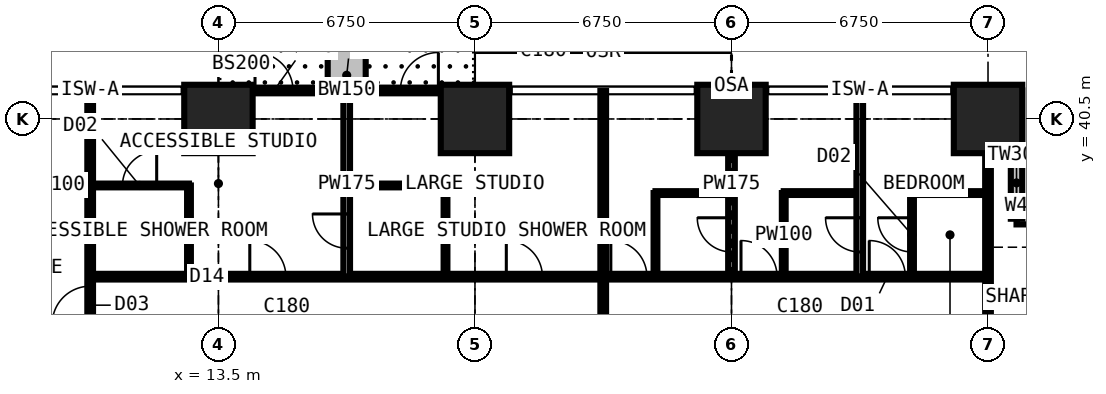
"""IFC4 building model, lengths in metres.
Left out: names, types, materials, properties, quantities, classifications, styles, units other than length and angle.
Written with IfcOpenShell. Run it as: python <this file> out.ifc"""

import sys

from ifc_helpers import new_model, si_unit, direction, frame, frame_2d, origin, origin_2d, place, context, subcontext, project, spatial, rectangle, extrude, element, fill, save


model = new_model("IFC4")
c1 = context("Model", 3, precision=1e-05, world=origin(), true_north=direction((0.0, 1.0)))
c2 = subcontext(c1, "Body", "Model", "MODEL_VIEW")
j1 = project(units=[si_unit("LENGTHUNIT", "METRE"), si_unit("PLANEANGLEUNIT", "RADIAN")], contexts=[c1])
p1 = place(None, origin())
s1 = spatial("IfcSite", under=j1, at=p1, CompositionType="ELEMENT")
p2 = place(p1, origin())
s2 = spatial("IfcBuilding", under=s1, at=p2, CompositionType="ELEMENT")
p3 = place(p2, frame((0.0, 0.0, 61.2)))
s3 = spatial("IfcBuildingStorey", under=s2, at=p3, CompositionType="ELEMENT", Elevation=61.2)
for number, where, z_axis, x_axis in (
    (1, (13.5, 40.5, 0.0), (0.0, 0.0, 1.0), (1.0, 0.0, 0.0)),
    (2, (20.25, 40.5, 0.0), (0.0, 0.0, 1.0), (1.0, 0.0, 0.0)),
    (3, (27.0, 40.5, 0.0), (0.0, 0.0, 1.0), (1.0, 0.0, 0.0)),
    (4, (33.75, 40.5, 0.0), (0.0, 0.0, 1.0), (1.0, 0.0, 0.0)),
):
    element("IfcColumn", number, at=place(p3, frame(where, z_axis=z_axis, x_axis=x_axis)), inside=s3, PredefinedType="COLUMN", context=c2, shape_type="SweptSolid", body=[
        extrude(rectangle(XDim=1.8, YDim=1.8, at=origin_2d()), origin(), (0.0, 0.0, 1.0), 3.6),
    ])
p4 = place(p3, frame((37.875, 37.875, 0.0), z_axis=(0.0, 0.0, 1.0), x_axis=(-1.0, 0.0, 0.0)))
e5 = element("IfcWall", 5, at=p4, inside=s3, PredefinedType="SOLIDWALL", context=c2, shape_type="SweptSolid", body=[
    extrude(rectangle(XDim=3.375, YDim=0.3, at=frame_2d((1.688, 0.0))), origin(), (0.0, 0.0, 1.0), 3.375),
])
p5 = place(p4, frame((0.788, 0.0, 0.6)))
e6 = element("IfcOpeningElement", 6, at=p5, cuts=e5, PredefinedType="OPENING", context=c2, shape_type="SweptSolid", body=[
    extrude(rectangle(XDim=1.8, YDim=2.1, at=frame_2d((0.9, 1.05))), frame((0.0, 0.16, 0.0), z_axis=(0.0, -1.0, 0.0), x_axis=(1.0, 0.0, 0.0)), (0.0, 0.0, 1.0), 0.32),
])
p6 = place(p3, frame((34.5, 37.875, 0.0), z_axis=(0.0, 0.0, 1.0), x_axis=(0.0, 1.0, 0.0)))
e7 = element("IfcWall", 7, at=p6, inside=s3, PredefinedType="SOLIDWALL", context=c2, shape_type="SweptSolid", body=[
    extrude(rectangle(XDim=3.375, YDim=0.3, at=frame_2d((1.688, 0.0))), origin(), (0.0, 0.0, 1.0), 3.375),
])
p7 = place(p6, frame((0.343, 0.0, 0.9)))
e8 = element("IfcOpeningElement", 8, at=p7, cuts=e7, PredefinedType="OPENING", context=c2, shape_type="SweptSolid", body=[
    extrude(rectangle(XDim=1.2, YDim=1.8, at=frame_2d((0.6, 0.9))), frame((0.0, 0.16, 0.0), z_axis=(0.0, -1.0, 0.0), x_axis=(1.0, 0.0, 0.0)), (0.0, 0.0, 1.0), 0.32),
])
p8 = place(p3, frame((13.5, 41.25, 0.0), z_axis=(0.0, 0.0, 1.0), x_axis=(1.0, 0.0, 0.0)))
e9 = element("IfcWall", 9, at=p8, inside=s3, PredefinedType="SOLIDWALL", context=c2, shape_type="SweptSolid", body=[
    extrude(rectangle(XDim=6.75, YDim=0.15, at=frame_2d((3.375, 0.0))), origin(), (0.0, 0.0, 1.0), 3.375),
])
p9 = place(p8, frame((0.962, 0.0, 0.0)))
e10 = element("IfcOpeningElement", 10, at=p9, cuts=e9, PredefinedType="OPENING", context=c2, shape_type="SweptSolid", body=[
    extrude(rectangle(XDim=1.0, YDim=2.2, at=frame_2d((0.5, 1.1))), frame((0.0, 0.085, 0.0), z_axis=(0.0, -1.0, 0.0), x_axis=(1.0, 0.0, 0.0)), (0.0, 0.0, 1.0), 0.17),
])
p10 = place(p8, frame((2.025, 0.0, 0.9)))
e11 = element("IfcOpeningElement", 11, at=p10, cuts=e9, PredefinedType="OPENING", context=c2, shape_type="SweptSolid", body=[
    extrude(rectangle(XDim=1.2, YDim=1.8, at=frame_2d((0.6, 0.9))), frame((0.0, 0.085, 0.0), z_axis=(0.0, -1.0, 0.0), x_axis=(1.0, 0.0, 0.0)), (0.0, 0.0, 1.0), 0.17),
])
p11 = place(p8, frame((4.788, 0.0, 0.0)))
e12 = element("IfcOpeningElement", 12, at=p11, cuts=e9, PredefinedType="OPENING", context=c2, shape_type="SweptSolid", body=[
    extrude(rectangle(XDim=1.0, YDim=2.2, at=frame_2d((0.5, 1.1))), frame((0.0, 0.085, 0.0), z_axis=(0.0, -1.0, 0.0), x_axis=(1.0, 0.0, 0.0)), (0.0, 0.0, 1.0), 0.17),
])
p12 = place(p8, frame((3.525, 0.0, 0.9)))
e13 = element("IfcOpeningElement", 13, at=p12, cuts=e9, PredefinedType="OPENING", context=c2, shape_type="SweptSolid", body=[
    extrude(rectangle(XDim=1.2, YDim=1.8, at=frame_2d((0.6, 0.9))), frame((0.0, 0.085, 0.0), z_axis=(0.0, -1.0, 0.0), x_axis=(1.0, 0.0, 0.0)), (0.0, 0.0, 1.0), 0.17),
])
p13 = place(p3, frame((16.875, 41.35, 0.0), z_axis=(0.0, 0.0, 1.0), x_axis=(0.0, 1.0, 0.0)))
e14 = element("IfcWall", 14, at=p13, inside=s3, PredefinedType="USERDEFINED", context=c2, shape_type="SweptSolid", body=[
    extrude(rectangle(XDim=2.2, YDim=1.0, at=frame_2d((1.1, 0.0))), origin(), (0.0, 0.0, 1.0), 0.9),
])
p14 = place(p3, frame((10.125, 30.375, 0.0), z_axis=(0.0, 0.0, 1.0), x_axis=(0.0, 1.0, 0.0)))
e15 = element("IfcWall", 15, at=p14, inside=s3, PredefinedType="PARTITIONING", context=c2, shape_type="SweptSolid", body=[
    extrude(rectangle(XDim=10.859, YDim=0.15, at=frame_2d((5.429, 0.0))), origin(), (0.0, 0.0, 1.0), 3.375),
])
p15 = place(p14, frame((4.725, 0.0, 0.0)))
e16 = element("IfcOpeningElement", 16, at=p15, cuts=e15, PredefinedType="OPENING", context=c2, shape_type="SweptSolid", body=[
    extrude(rectangle(XDim=1.0, YDim=2.2, at=frame_2d((0.5, 1.1))), frame((0.0, 0.085, 0.0), z_axis=(0.0, -1.0, 0.0), x_axis=(1.0, 0.0, 0.0)), (0.0, 0.0, 1.0), 0.17),
])
p16 = place(p3, frame((10.125, 36.35, 0.0), z_axis=(0.0, 0.0, 1.0), x_axis=(1.0, 0.0, 0.0)))
e17 = element("IfcWall", 17, at=p16, inside=s3, PredefinedType="PARTITIONING", context=c2, shape_type="SweptSolid", body=[
    extrude(rectangle(XDim=23.625, YDim=0.15, at=frame_2d((11.812, 0.0))), origin(), (0.0, 0.0, 1.0), 3.375),
])
p17 = place(p16, frame((20.5, 0.0, 0.0)))
e18 = element("IfcOpeningElement", 18, at=p17, cuts=e17, PredefinedType="OPENING", context=c2, shape_type="SweptSolid", body=[
    extrude(rectangle(XDim=0.95, YDim=2.2, at=frame_2d((0.475, 1.1))), frame((0.0, 0.085, 0.0), z_axis=(0.0, -1.0, 0.0), x_axis=(1.0, 0.0, 0.0)), (0.0, 0.0, 1.0), 0.17),
])
p18 = place(p16, frame((17.125, 0.0, 0.0)))
e19 = element("IfcOpeningElement", 19, at=p18, cuts=e17, PredefinedType="OPENING", context=c2, shape_type="SweptSolid", body=[
    extrude(rectangle(XDim=0.95, YDim=2.2, at=frame_2d((0.475, 1.1))), frame((0.0, 0.085, 0.0), z_axis=(0.0, -1.0, 0.0), x_axis=(1.0, 0.0, 0.0)), (0.0, 0.0, 1.0), 0.17),
])
p19 = place(p16, frame((13.7, 0.0, 0.0)))
e20 = element("IfcOpeningElement", 20, at=p19, cuts=e17, PredefinedType="OPENING", context=c2, shape_type="SweptSolid", body=[
    extrude(rectangle(XDim=0.95, YDim=2.2, at=frame_2d((0.475, 1.1))), frame((0.0, 0.085, 0.0), z_axis=(0.0, -1.0, 0.0), x_axis=(1.0, 0.0, 0.0)), (0.0, 0.0, 1.0), 0.17),
])
p20 = place(p16, frame((4.2, 0.0, 0.0)))
e21 = element("IfcOpeningElement", 21, at=p20, cuts=e17, PredefinedType="OPENING", context=c2, shape_type="SweptSolid", body=[
    extrude(rectangle(XDim=0.95, YDim=2.2, at=frame_2d((0.475, 1.1))), frame((0.0, 0.085, 0.0), z_axis=(0.0, -1.0, 0.0), x_axis=(1.0, 0.0, 0.0)), (0.0, 0.0, 1.0), 0.17),
])
p21 = place(p16, frame((10.95, 0.0, 0.0)))
e22 = element("IfcOpeningElement", 22, at=p21, cuts=e17, PredefinedType="OPENING", context=c2, shape_type="SweptSolid", body=[
    extrude(rectangle(XDim=0.95, YDim=2.2, at=frame_2d((0.475, 1.1))), frame((0.0, 0.085, 0.0), z_axis=(0.0, -1.0, 0.0), x_axis=(1.0, 0.0, 0.0)), (0.0, 0.0, 1.0), 0.17),
])
p22 = place(p3, frame((10.125, 38.75, 0.0), z_axis=(0.0, 0.0, 1.0), x_axis=(1.0, 0.0, 0.0)))
e23 = element("IfcWall", 23, at=p22, inside=s3, PredefinedType="PARTITIONING", context=c2, shape_type="SweptSolid", body=[
    extrude(rectangle(XDim=2.6, YDim=0.1, at=frame_2d((1.3, 0.0))), origin(), (0.0, 0.0, 1.0), 3.375),
])
p23 = place(p22, frame((0.85, 0.0, 0.0)))
e24 = element("IfcOpeningElement", 24, at=p23, cuts=e23, PredefinedType="OPENING", context=c2, shape_type="SweptSolid", body=[
    extrude(rectangle(XDim=0.9, YDim=2.2, at=frame_2d((0.45, 1.1))), frame((0.0, 0.06, 0.0), z_axis=(0.0, -1.0, 0.0), x_axis=(1.0, 0.0, 0.0)), (0.0, 0.0, 1.0), 0.12),
])
p24 = place(p3, frame((12.725, 36.35, 0.0), z_axis=(0.0, 0.0, 1.0), x_axis=(0.0, 1.0, 0.0)))
e25 = element("IfcWall", 25, at=p24, inside=s3, PredefinedType="PARTITIONING", context=c2, shape_type="SweptSolid", body=[
    extrude(rectangle(XDim=2.4, YDim=0.1, at=frame_2d((1.2, 0.0))), origin(), (0.0, 0.0, 1.0), 3.375),
])
p25 = place(p3, frame((16.875, 36.35, 0.0), z_axis=(0.0, 0.0, 1.0), x_axis=(0.0, 1.0, 0.0)))
e26 = element("IfcWall", 26, at=p25, inside=s3, PredefinedType="PARTITIONING", context=c2, shape_type="SweptSolid", body=[
    extrude(rectangle(XDim=4.884, YDim=0.175, at=frame_2d((2.442, 0.0))), origin(), (0.0, 0.0, 1.0), 3.375),
])
p26 = place(p25, frame((0.75, 0.0, 0.0)))
e27 = element("IfcOpeningElement", 27, at=p26, cuts=e26, PredefinedType="OPENING", context=c2, shape_type="SweptSolid", body=[
    extrude(rectangle(XDim=0.9, YDim=2.2, at=frame_2d((0.45, 1.1))), frame((0.0, 0.097, 0.0), z_axis=(0.0, -1.0, 0.0), x_axis=(1.0, 0.0, 0.0)), (0.0, 0.0, 1.0), 0.195),
])
p27 = place(p3, frame((16.875, 38.75, 0.0), z_axis=(0.0, 0.0, 1.0), x_axis=(1.0, 0.0, 0.0)))
e28 = element("IfcWall", 28, at=p27, inside=s3, PredefinedType="PARTITIONING", context=c2, shape_type="SweptSolid", body=[
    extrude(rectangle(XDim=2.6, YDim=0.1, at=frame_2d((1.3, 0.0))), origin(), (0.0, 0.0, 1.0), 3.375),
])
p28 = place(p3, frame((19.475, 36.35, 0.0), z_axis=(0.0, 0.0, 1.0), x_axis=(0.0, 1.0, 0.0)))
e29 = element("IfcWall", 29, at=p28, inside=s3, PredefinedType="PARTITIONING", context=c2, shape_type="SweptSolid", body=[
    extrude(rectangle(XDim=2.4, YDim=0.1, at=frame_2d((1.2, 0.0))), origin(), (0.0, 0.0, 1.0), 3.375),
])
p29 = place(p3, frame((23.625, 29.2, 0.0), z_axis=(0.0, 0.0, 1.0), x_axis=(0.0, 1.0, 0.0)))
e30 = element("IfcWall", 30, at=p29, inside=s3, PredefinedType="PARTITIONING", context=c2, shape_type="SweptSolid", body=[
    extrude(rectangle(XDim=12.034, YDim=0.15, at=frame_2d((6.017, 0.0))), origin(), (0.0, 0.0, 1.0), 3.375),
])
p30 = place(p3, frame((25.0, 36.35, 0.0), z_axis=(0.0, 0.0, 1.0), x_axis=(0.0, 1.0, 0.0)))
e31 = element("IfcWall", 31, at=p30, inside=s3, PredefinedType="PARTITIONING", context=c2, shape_type="SweptSolid", body=[
    extrude(rectangle(XDim=2.2, YDim=0.1, at=frame_2d((1.1, 0.0))), origin(), (0.0, 0.0, 1.0), 3.375),
])
p31 = place(p3, frame((25.0, 38.55, 0.0), z_axis=(0.0, 0.0, 1.0), x_axis=(1.0, 0.0, 0.0)))
e32 = element("IfcWall", 32, at=p31, inside=s3, PredefinedType="PARTITIONING", context=c2, shape_type="SweptSolid", body=[
    extrude(rectangle(XDim=2.0, YDim=0.1, at=frame_2d((1.0, 0.0))), origin(), (0.0, 0.0, 1.0), 3.375),
])
p32 = place(p3, frame((27.0, 36.35, 0.0), z_axis=(0.0, 0.0, 1.0), x_axis=(0.0, 1.0, 0.0)))
e33 = element("IfcWall", 33, at=p32, inside=s3, PredefinedType="PARTITIONING", context=c2, shape_type="SweptSolid", body=[
    extrude(rectangle(XDim=4.884, YDim=0.175, at=frame_2d((2.442, 0.0))), origin(), (0.0, 0.0, 1.0), 2.61),
])
p33 = place(p32, frame((0.65, 0.0, 0.0)))
e34 = element("IfcOpeningElement", 34, at=p33, cuts=e33, PredefinedType="OPENING", context=c2, shape_type="SweptSolid", body=[
    extrude(rectangle(XDim=0.9, YDim=2.2, at=frame_2d((0.45, 1.1))), frame((0.0, 0.097, 0.0), z_axis=(0.0, -1.0, 0.0), x_axis=(1.0, 0.0, 0.0)), (0.0, 0.0, 1.0), 0.195),
])
p34 = place(p3, frame((28.375, 36.35, 0.0), z_axis=(0.0, 0.0, 1.0), x_axis=(0.0, 1.0, 0.0)))
e35 = element("IfcWall", 35, at=p34, inside=s3, PredefinedType="PARTITIONING", context=c2, shape_type="SweptSolid", body=[
    extrude(rectangle(XDim=2.2, YDim=0.1, at=frame_2d((1.1, 0.0))), origin(), (0.0, 0.0, 1.0), 3.375),
])
p35 = place(p3, frame((28.375, 38.55, 0.0), z_axis=(0.0, 0.0, 1.0), x_axis=(1.0, 0.0, 0.0)))
e36 = element("IfcWall", 36, at=p35, inside=s3, PredefinedType="PARTITIONING", context=c2, shape_type="SweptSolid", body=[
    extrude(rectangle(XDim=2.0, YDim=0.1, at=frame_2d((1.0, 0.0))), origin(), (0.0, 0.0, 1.0), 3.375),
])
p36 = place(p3, frame((30.375, 36.35, 0.0), z_axis=(0.0, 0.0, 1.0), x_axis=(0.0, 1.0, 0.0)))
e37 = element("IfcWall", 37, at=p36, inside=s3, PredefinedType="PARTITIONING", context=c2, shape_type="SweptSolid", body=[
    extrude(rectangle(XDim=4.884, YDim=0.175, at=frame_2d((2.442, 0.0))), origin(), (0.0, 0.0, 1.0), 3.375),
])
p37 = place(p36, frame((0.65, 0.0, 0.0)))
e38 = element("IfcOpeningElement", 38, at=p37, cuts=e37, PredefinedType="OPENING", context=c2, shape_type="SweptSolid", body=[
    extrude(rectangle(XDim=0.9, YDim=2.2, at=frame_2d((0.45, 1.1))), frame((0.0, 0.097, 0.0), z_axis=(0.0, -1.0, 0.0), x_axis=(1.0, 0.0, 0.0)), (0.0, 0.0, 1.0), 0.195),
])
p38 = place(p3, frame((31.75, 36.35, 0.0), z_axis=(0.0, 0.0, 1.0), x_axis=(0.0, 1.0, 0.0)))
e39 = element("IfcWall", 39, at=p38, inside=s3, PredefinedType="PARTITIONING", context=c2, shape_type="SweptSolid", body=[
    extrude(rectangle(XDim=2.2, YDim=0.1, at=frame_2d((1.1, 0.0))), origin(), (0.0, 0.0, 1.0), 3.375),
])
p39 = place(p38, frame((0.65, 0.0, 0.0)))
e40 = element("IfcOpeningElement", 40, at=p39, cuts=e39, PredefinedType="OPENING", context=c2, shape_type="SweptSolid", body=[
    extrude(rectangle(XDim=0.9, YDim=2.2, at=frame_2d((0.45, 1.1))), frame((0.0, 0.06, 0.0), z_axis=(0.0, -1.0, 0.0), x_axis=(1.0, 0.0, 0.0)), (0.0, 0.0, 1.0), 0.12),
])
p40 = place(p3, frame((31.75, 38.55, 0.0), z_axis=(0.0, 0.0, 1.0), x_axis=(1.0, 0.0, 0.0)))
e41 = element("IfcWall", 41, at=p40, inside=s3, PredefinedType="PARTITIONING", context=c2, shape_type="SweptSolid", body=[
    extrude(rectangle(XDim=2.0, YDim=0.1, at=frame_2d((1.0, 0.0))), origin(), (0.0, 0.0, 1.0), 3.375),
])
p41 = place(p3, frame((33.75, 30.375, 0.0), z_axis=(0.0, 0.0, 1.0), x_axis=(0.0, 1.0, 0.0)))
e42 = element("IfcWall", 42, at=p41, inside=s3, PredefinedType="PARTITIONING", context=c2, shape_type="SweptSolid", body=[
    extrude(rectangle(XDim=10.859, YDim=0.15, at=frame_2d((5.429, 0.0))), origin(), (0.0, 0.0, 1.0), 2.877),
])
p42 = place(p41, frame((1.45, 0.0, 0.0)))
e43 = element("IfcOpeningElement", 43, at=p42, cuts=e42, PredefinedType="OPENING", context=c2, shape_type="SweptSolid", body=[
    extrude(rectangle(XDim=1.0, YDim=2.2, at=frame_2d((0.5, 1.1))), frame((0.0, 0.085, 0.0), z_axis=(0.0, -1.0, 0.0), x_axis=(1.0, 0.0, 0.0)), (0.0, 0.0, 1.0), 0.17),
])
p43 = place(p7, origin())
e44 = element("IfcWindow", 44, at=p43, inside=s3, PartitioningType="SINGLE_PANEL", PredefinedType="WINDOW", context=c2, shape_type="SweptSolid", body=[
    extrude(rectangle(XDim=1.2, YDim=1.8, at=frame_2d((0.6, 0.9))), frame((0.0, 0.03, 0.0), z_axis=(0.0, -1.0, 0.0), x_axis=(1.0, 0.0, 0.0)), (0.0, 0.0, 1.0), 0.06),
])
fill(e8, e44)
p44 = place(p9, origin())
e45 = element("IfcDoor", 45, at=p44, inside=s3, OperationType="SINGLE_SWING_LEFT", PredefinedType="DOOR", context=c2, shape_type="SweptSolid", body=[
    extrude(rectangle(XDim=1.0, YDim=2.2, at=frame_2d((0.5, 1.1))), frame((0.0, 0.025, 0.0), z_axis=(0.0, -1.0, 0.0), x_axis=(1.0, 0.0, 0.0)), (0.0, 0.0, 1.0), 0.05),
])
fill(e10, e45)
p45 = place(p10, origin())
e46 = element("IfcWindow", 46, at=p45, inside=s3, PartitioningType="SINGLE_PANEL", PredefinedType="WINDOW", context=c2, shape_type="SweptSolid", body=[
    extrude(rectangle(XDim=1.2, YDim=1.8, at=frame_2d((0.6, 0.9))), frame((0.0, 0.03, 0.0), z_axis=(0.0, -1.0, 0.0), x_axis=(1.0, 0.0, 0.0)), (0.0, 0.0, 1.0), 0.06),
])
fill(e11, e46)
p46 = place(p11, origin())
e47 = element("IfcDoor", 47, at=p46, inside=s3, OperationType="SINGLE_SWING_RIGHT", PredefinedType="DOOR", context=c2, shape_type="SweptSolid", body=[
    extrude(rectangle(XDim=1.0, YDim=2.2, at=frame_2d((0.5, 1.1))), frame((0.0, 0.025, 0.0), z_axis=(0.0, -1.0, 0.0), x_axis=(1.0, 0.0, 0.0)), (0.0, 0.0, 1.0), 0.05),
])
fill(e12, e47)
p47 = place(p12, origin())
e48 = element("IfcWindow", 48, at=p47, inside=s3, PartitioningType="SINGLE_PANEL", PredefinedType="WINDOW", context=c2, shape_type="SweptSolid", body=[
    extrude(rectangle(XDim=1.2, YDim=1.8, at=frame_2d((0.6, 0.9))), frame((0.0, 0.03, 0.0), z_axis=(0.0, -1.0, 0.0), x_axis=(1.0, 0.0, 0.0)), (0.0, 0.0, 1.0), 0.06),
])
fill(e13, e48)
p48 = place(p17, origin())
e49 = element("IfcDoor", 49, at=p48, inside=s3, OperationType="SINGLE_SWING_LEFT", PredefinedType="DOOR", context=c2, shape_type="SweptSolid", body=[
    extrude(rectangle(XDim=0.95, YDim=2.2, at=frame_2d((0.475, 1.1))), frame((0.0, 0.025, 0.0), z_axis=(0.0, -1.0, 0.0), x_axis=(1.0, 0.0, 0.0)), (0.0, 0.0, 1.0), 0.05),
])
fill(e18, e49)
p49 = place(p39, origin())
e50 = element("IfcDoor", 50, at=p49, inside=s3, OperationType="SINGLE_SWING_RIGHT", PredefinedType="DOOR", context=c2, shape_type="SweptSolid", body=[
    extrude(rectangle(XDim=0.9, YDim=2.2, at=frame_2d((0.45, 1.1))), frame((0.0, 0.025, 0.0), z_axis=(0.0, -1.0, 0.0), x_axis=(1.0, 0.0, 0.0)), (0.0, 0.0, 1.0), 0.05),
])
fill(e40, e50)
p50 = place(p18, origin())
e51 = element("IfcDoor", 51, at=p50, inside=s3, OperationType="SINGLE_SWING_LEFT", PredefinedType="DOOR", context=c2, shape_type="SweptSolid", body=[
    extrude(rectangle(XDim=0.95, YDim=2.2, at=frame_2d((0.475, 1.1))), frame((0.0, 0.025, 0.0), z_axis=(0.0, -1.0, 0.0), x_axis=(1.0, 0.0, 0.0)), (0.0, 0.0, 1.0), 0.05),
])
fill(e19, e51)
p51 = place(p37, origin())
e52 = element("IfcDoor", 52, at=p51, inside=s3, OperationType="SINGLE_SWING_RIGHT", PredefinedType="DOOR", context=c2, shape_type="SweptSolid", body=[
    extrude(rectangle(XDim=0.9, YDim=2.2, at=frame_2d((0.45, 1.1))), frame((0.0, 0.025, 0.0), z_axis=(0.0, -1.0, 0.0), x_axis=(1.0, 0.0, 0.0)), (0.0, 0.0, 1.0), 0.05),
])
fill(e38, e52)
p52 = place(p19, origin())
e53 = element("IfcDoor", 53, at=p52, inside=s3, OperationType="SINGLE_SWING_LEFT", PredefinedType="DOOR", context=c2, shape_type="SweptSolid", body=[
    extrude(rectangle(XDim=0.95, YDim=2.2, at=frame_2d((0.475, 1.1))), frame((0.0, 0.025, 0.0), z_axis=(0.0, -1.0, 0.0), x_axis=(1.0, 0.0, 0.0)), (0.0, 0.0, 1.0), 0.05),
])
fill(e20, e53)
p53 = place(p33, origin())
e54 = element("IfcDoor", 54, at=p53, inside=s3, OperationType="SINGLE_SWING_RIGHT", PredefinedType="DOOR", context=c2, shape_type="SweptSolid", body=[
    extrude(rectangle(XDim=0.9, YDim=2.2, at=frame_2d((0.45, 1.1))), frame((0.0, 0.025, 0.0), z_axis=(0.0, -1.0, 0.0), x_axis=(1.0, 0.0, 0.0)), (0.0, 0.0, 1.0), 0.05),
])
fill(e34, e54)
p54 = place(p20, origin())
e55 = element("IfcDoor", 55, at=p54, inside=s3, OperationType="SINGLE_SWING_LEFT", PredefinedType="DOOR", context=c2, shape_type="SweptSolid", body=[
    extrude(rectangle(XDim=0.95, YDim=2.2, at=frame_2d((0.475, 1.1))), frame((0.0, 0.025, 0.0), z_axis=(0.0, -1.0, 0.0), x_axis=(1.0, 0.0, 0.0)), (0.0, 0.0, 1.0), 0.05),
])
fill(e21, e55)
p55 = place(p23, origin())
e56 = element("IfcDoor", 56, at=p55, inside=s3, OperationType="SINGLE_SWING_RIGHT", PredefinedType="DOOR", context=c2, shape_type="SweptSolid", body=[
    extrude(rectangle(XDim=0.9, YDim=2.2, at=frame_2d((0.45, 1.1))), frame((0.0, 0.025, 0.0), z_axis=(0.0, -1.0, 0.0), x_axis=(1.0, 0.0, 0.0)), (0.0, 0.0, 1.0), 0.05),
])
fill(e24, e56)
p56 = place(p21, origin())
e57 = element("IfcDoor", 57, at=p56, inside=s3, OperationType="SINGLE_SWING_LEFT", PredefinedType="DOOR", context=c2, shape_type="SweptSolid", body=[
    extrude(rectangle(XDim=0.95, YDim=2.2, at=frame_2d((0.475, 1.1))), frame((0.0, 0.025, 0.0), z_axis=(0.0, -1.0, 0.0), x_axis=(1.0, 0.0, 0.0)), (0.0, 0.0, 1.0), 0.05),
])
fill(e22, e57)
p57 = place(p26, origin())
e58 = element("IfcDoor", 58, at=p57, inside=s3, OperationType="SINGLE_SWING_RIGHT", PredefinedType="DOOR", context=c2, shape_type="SweptSolid", body=[
    extrude(rectangle(XDim=0.9, YDim=2.2, at=frame_2d((0.45, 1.1))), frame((0.0, 0.025, 0.0), z_axis=(0.0, -1.0, 0.0), x_axis=(1.0, 0.0, 0.0)), (0.0, 0.0, 1.0), 0.05),
])
fill(e27, e58)
p58 = place(p15, origin())
e59 = element("IfcDoor", 59, at=p58, inside=s3, OperationType="SINGLE_SWING_LEFT", PredefinedType="DOOR", context=c2, shape_type="SweptSolid", body=[
    extrude(rectangle(XDim=1.0, YDim=2.2, at=frame_2d((0.5, 1.1))), frame((0.0, 0.025, 0.0), z_axis=(0.0, -1.0, 0.0), x_axis=(1.0, 0.0, 0.0)), (0.0, 0.0, 1.0), 0.05),
])
fill(e16, e59)
save(model, sys.argv[1])
